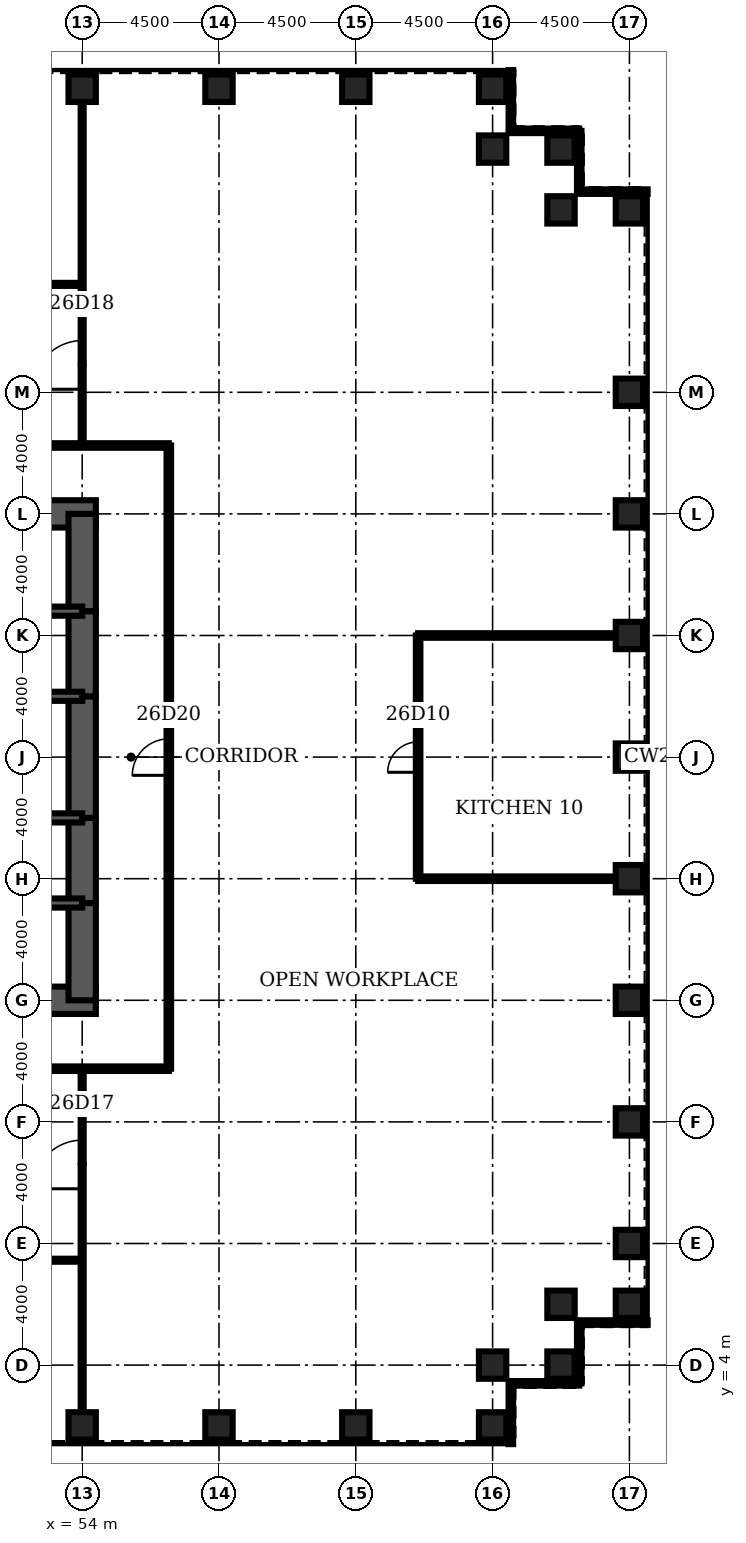
"""IFC4 building model, lengths in metres.
Left out: names, types, materials, properties, quantities, classifications, styles, units other than length and angle.
Written with IfcOpenShell. Run it as: python <this file> out.ifc"""

import sys

from ifc_helpers import new_model, si_unit, direction, frame, frame_2d, origin, origin_2d, place, context, subcontext, project, spatial, rectangle, hollow_rectangle, extrude, element, fill, save


model = new_model("IFC4")
c1 = context("Model", 3, precision=1e-05, world=origin(), true_north=direction((0.0, 1.0)))
c2 = subcontext(c1, "Body", "Model", "MODEL_VIEW")
j1 = project(units=[si_unit("LENGTHUNIT", "METRE"), si_unit("PLANEANGLEUNIT", "RADIAN")], contexts=[c1])
p1 = place(None, origin())
s1 = spatial("IfcSite", under=j1, at=p1, CompositionType="ELEMENT")
p2 = place(p1, origin())
s2 = spatial("IfcBuilding", under=s1, at=p2, CompositionType="ELEMENT")
p3 = place(p2, frame((0.0, 0.0, 121.5)))
s3 = spatial("IfcBuildingStorey", under=s2, at=p3, CompositionType="ELEMENT", Elevation=121.5)
for number, where, z_axis, x_axis in (
    (1, (54.0, 2.0, 0.0), (0.0, 0.0, 1.0), (0.0, 1.0, 0.0)),
    (2, (58.5, 2.0, 0.0), (0.0, 0.0, 1.0), (0.0, 1.0, 0.0)),
    (3, (63.0, 2.0, 0.0), (0.0, 0.0, 1.0), (0.0, 1.0, 0.0)),
    (4, (67.5, 2.0, 0.0), (0.0, 0.0, 1.0), (0.0, 1.0, 0.0)),
    (5, (67.5, 4.0, 0.0), (0.0, 0.0, 1.0), (0.0, 1.0, 0.0)),
    (6, (69.75, 4.0, 0.0), (0.0, 0.0, 1.0), (1.0, 0.0, 0.0)),
    (7, (69.75, 6.0, 0.0), (0.0, 0.0, 1.0), (1.0, 0.0, 0.0)),
    (8, (72.0, 6.0, 0.0), (0.0, 0.0, 1.0), (1.0, 0.0, 0.0)),
    (9, (72.0, 8.0, 0.0), (0.0, 0.0, 1.0), (1.0, 0.0, 0.0)),
    (10, (72.0, 12.0, 0.0), (0.0, 0.0, 1.0), (1.0, 0.0, 0.0)),
    (11, (72.0, 16.0, 0.0), (0.0, 0.0, 1.0), (1.0, 0.0, 0.0)),
    (12, (72.0, 20.0, 0.0), (0.0, 0.0, 1.0), (1.0, 0.0, 0.0)),
    (13, (72.0, 24.0, 0.0), (0.0, 0.0, 1.0), (1.0, 0.0, 0.0)),
    (14, (72.0, 28.0, 0.0), (0.0, 0.0, 1.0), (1.0, 0.0, 0.0)),
    (15, (72.0, 32.0, 0.0), (0.0, 0.0, 1.0), (1.0, 0.0, 0.0)),
    (16, (72.0, 36.0, 0.0), (0.0, 0.0, 1.0), (1.0, 0.0, 0.0)),
    (17, (72.0, 42.0, 0.0), (0.0, 0.0, 1.0), (1.0, 0.0, 0.0)),
    (18, (69.75, 42.0, 0.0), (0.0, 0.0, 1.0), (1.0, 0.0, 0.0)),
    (19, (69.75, 44.0, 0.0), (0.0, 0.0, 1.0), (1.0, 0.0, 0.0)),
    (20, (67.5, 44.0, 0.0), (0.0, 0.0, 1.0), (0.0, 1.0, 0.0)),
    (21, (67.5, 46.0, 0.0), (0.0, 0.0, 1.0), (0.0, 1.0, 0.0)),
    (22, (63.0, 46.0, 0.0), (0.0, 0.0, 1.0), (0.0, 1.0, 0.0)),
    (23, (58.5, 46.0, 0.0), (0.0, 0.0, 1.0), (0.0, 1.0, 0.0)),
    (24, (54.0, 46.0, 0.0), (0.0, 0.0, 1.0), (0.0, 1.0, 0.0)),
):
    element("IfcColumn", number, at=place(p3, frame(where, z_axis=z_axis, x_axis=x_axis)), inside=s3, PredefinedType="COLUMN", context=c2, shape_type="SweptSolid", body=[
        extrude(hollow_rectangle(XDim=0.9, YDim=0.9, WallThickness=0.1, at=origin_2d()), origin(), (0.0, 0.0, 1.0), 4.2),
    ])
for number, where, z_axis, x_axis in (
    (25, (45.0, 16.0, 0.0), (0.0, 0.0, 1.0), (1.0, 0.0, 0.0)),
    (26, (54.45, 32.0, 0.0), (0.0, 0.0, 1.0), (-1.0, 0.0, 0.0)),
):
    element("IfcWall", number, at=place(p3, frame(where, z_axis=z_axis, x_axis=x_axis)), inside=s3, PredefinedType="SHEAR", context=c2, shape_type="SweptSolid", body=[
        extrude(rectangle(XDim=9.45, YDim=0.9, at=frame_2d((4.725, 0.0))), origin(), (0.0, 0.0, 1.0), 4.2),
    ])
p4 = place(p3, frame((54.0, 16.0, 0.0), z_axis=(0.0, 0.0, 1.0), x_axis=(0.0, 1.0, 0.0)))
e27 = element("IfcWall", 27, at=p4, inside=s3, PredefinedType="SHEAR", context=c2, shape_type="SweptSolid", body=[
    extrude(rectangle(XDim=3.2, YDim=0.9, at=frame_2d((1.6, 0.0))), origin(), (0.0, 0.0, 1.0), 4.2),
])
p5 = place(p3, frame((54.0, 19.2, 0.0), z_axis=(0.0, 0.0, 1.0), x_axis=(0.0, 1.0, 0.0)))
e28 = element("IfcWall", 28, at=p5, inside=s3, PredefinedType="SHEAR", context=c2, shape_type="SweptSolid", body=[
    extrude(rectangle(XDim=2.8, YDim=0.9, at=frame_2d((1.4, 0.0))), origin(), (0.0, 0.0, 1.0), 4.2),
])
p6 = place(p5, frame((0.4, 0.0, 0.0)))
e29 = element("IfcOpeningElement", 29, at=p6, cuts=e28, PredefinedType="OPENING", context=c2, shape_type="SweptSolid", body=[
    extrude(rectangle(XDim=1.8, YDim=2.1, at=frame_2d((0.9, 1.05))), frame((0.0, 0.46, 0.0), z_axis=(0.0, -1.0, 0.0), x_axis=(1.0, 0.0, 0.0)), (0.0, 0.0, 1.0), 0.92),
])
p7 = place(p3, frame((54.0, 22.0, 0.0), z_axis=(0.0, 0.0, 1.0), x_axis=(0.0, 1.0, 0.0)))
e30 = element("IfcWall", 30, at=p7, inside=s3, PredefinedType="SHEAR", context=c2, shape_type="SweptSolid", body=[
    extrude(rectangle(XDim=4.0, YDim=0.9, at=frame_2d((2.0, 0.0))), origin(), (0.0, 0.0, 1.0), 4.2),
])
p8 = place(p3, frame((54.0, 26.0, 0.0), z_axis=(0.0, 0.0, 1.0), x_axis=(0.0, 1.0, 0.0)))
e31 = element("IfcWall", 31, at=p8, inside=s3, PredefinedType="SHEAR", context=c2, shape_type="SweptSolid", body=[
    extrude(rectangle(XDim=2.8, YDim=0.9, at=frame_2d((1.4, 0.0))), origin(), (0.0, 0.0, 1.0), 4.2),
])
p9 = place(p8, frame((0.6, 0.0, 0.0)))
e32 = element("IfcOpeningElement", 32, at=p9, cuts=e31, PredefinedType="OPENING", context=c2, shape_type="SweptSolid", body=[
    extrude(rectangle(XDim=1.8, YDim=2.1, at=frame_2d((0.9, 1.05))), frame((0.0, 0.46, 0.0), z_axis=(0.0, -1.0, 0.0), x_axis=(1.0, 0.0, 0.0)), (0.0, 0.0, 1.0), 0.92),
])
p10 = place(p3, frame((54.0, 28.8, 0.0), z_axis=(0.0, 0.0, 1.0), x_axis=(0.0, 1.0, 0.0)))
e33 = element("IfcWall", 33, at=p10, inside=s3, PredefinedType="SHEAR", context=c2, shape_type="SweptSolid", body=[
    extrude(rectangle(XDim=3.2, YDim=0.9, at=frame_2d((1.6, 0.0))), origin(), (0.0, 0.0, 1.0), 4.2),
])
p11 = place(p3, frame((45.0, 19.2, 0.0), z_axis=(0.0, 0.0, 1.0), x_axis=(1.0, 0.0, 0.0)))
e34 = element("IfcWall", 34, at=p11, inside=s3, PredefinedType="SOLIDWALL", context=c2, shape_type="SweptSolid", body=[
    extrude(rectangle(XDim=9.0, YDim=0.3, at=frame_2d((4.5, 0.0))), origin(), (0.0, 0.0, 1.0), 4.2),
])
p12 = place(p11, frame((7.35, 0.0, 0.0)))
e35 = element("IfcOpeningElement", 35, at=p12, cuts=e34, PredefinedType="OPENING", context=c2, shape_type="SweptSolid", body=[
    extrude(rectangle(XDim=1.0, YDim=2.1, at=frame_2d((0.5, 1.05))), frame((0.0, 0.16, 0.0), z_axis=(0.0, -1.0, 0.0), x_axis=(1.0, 0.0, 0.0)), (0.0, 0.0, 1.0), 0.32),
])
p13 = place(p3, frame((45.0, 28.8, 0.0), z_axis=(0.0, 0.0, 1.0), x_axis=(1.0, 0.0, 0.0)))
e36 = element("IfcWall", 36, at=p13, inside=s3, PredefinedType="SOLIDWALL", context=c2, shape_type="SweptSolid", body=[
    extrude(rectangle(XDim=9.0, YDim=0.3, at=frame_2d((4.5, 0.0))), origin(), (0.0, 0.0, 1.0), 4.2),
])
p14 = place(p13, frame((7.35, 0.0, 0.0)))
e37 = element("IfcOpeningElement", 37, at=p14, cuts=e36, PredefinedType="OPENING", context=c2, shape_type="SweptSolid", body=[
    extrude(rectangle(XDim=1.0, YDim=2.1, at=frame_2d((0.5, 1.05))), frame((0.0, 0.16, 0.0), z_axis=(0.0, -1.0, 0.0), x_axis=(1.0, 0.0, 0.0)), (0.0, 0.0, 1.0), 0.32),
])
p15 = place(p3, frame((48.0, 22.0, 0.0), z_axis=(0.0, 0.0, 1.0), x_axis=(1.0, 0.0, 0.0)))
e38 = element("IfcWall", 38, at=p15, inside=s3, PredefinedType="SOLIDWALL", context=c2, shape_type="SweptSolid", body=[
    extrude(rectangle(XDim=6.0, YDim=0.3, at=frame_2d((3.0, 0.0))), origin(), (0.0, 0.0, 1.0), 4.2),
])
p16 = place(p15, frame((2.0, 0.0, 0.0)))
e39 = element("IfcOpeningElement", 39, at=p16, cuts=e38, PredefinedType="OPENING", context=c2, shape_type="SweptSolid", body=[
    extrude(rectangle(XDim=1.0, YDim=2.1, at=frame_2d((0.5, 1.05))), frame((0.0, 0.16, 0.0), z_axis=(0.0, -1.0, 0.0), x_axis=(1.0, 0.0, 0.0)), (0.0, 0.0, 1.0), 0.32),
])
p17 = place(p15, frame((4.3, 0.0, 0.0)))
e40 = element("IfcOpeningElement", 40, at=p17, cuts=e38, PredefinedType="OPENING", context=c2, shape_type="SweptSolid", body=[
    extrude(rectangle(XDim=1.0, YDim=2.1, at=frame_2d((0.5, 1.05))), frame((0.0, 0.16, 0.0), z_axis=(0.0, -1.0, 0.0), x_axis=(1.0, 0.0, 0.0)), (0.0, 0.0, 1.0), 0.32),
])
p18 = place(p3, frame((48.0, 26.0, 0.0), z_axis=(0.0, 0.0, 1.0), x_axis=(1.0, 0.0, 0.0)))
e41 = element("IfcWall", 41, at=p18, inside=s3, PredefinedType="SOLIDWALL", context=c2, shape_type="SweptSolid", body=[
    extrude(rectangle(XDim=6.0, YDim=0.3, at=frame_2d((3.0, 0.0))), origin(), (0.0, 0.0, 1.0), 4.2),
])
p19 = place(p3, frame((36.0, 7.45, 0.0), z_axis=(0.0, 0.0, 1.0), x_axis=(1.0, 0.0, 0.0)))
e42 = element("IfcWall", 42, at=p19, inside=s3, PredefinedType="PARTITIONING", context=c2, shape_type="SweptSolid", body=[
    extrude(rectangle(XDim=18.0, YDim=0.1, at=frame_2d((9.0, 0.0))), origin(), (0.0, 0.0, 1.0), 3.0),
])
p20 = place(p19, frame((4.0, 0.0, 0.0)))
e43 = element("IfcOpeningElement", 43, at=p20, cuts=e42, PredefinedType="OPENING", context=c2, shape_type="SweptSolid", body=[
    extrude(rectangle(XDim=1.0, YDim=2.1, at=frame_2d((0.5, 1.05))), frame((0.0, 0.06, 0.0), z_axis=(0.0, -1.0, 0.0), x_axis=(1.0, 0.0, 0.0)), (0.0, 0.0, 1.0), 0.12),
])
p21 = place(p19, frame((13.0, 0.0, 0.0)))
e44 = element("IfcOpeningElement", 44, at=p21, cuts=e42, PredefinedType="OPENING", context=c2, shape_type="SweptSolid", body=[
    extrude(rectangle(XDim=1.0, YDim=2.1, at=frame_2d((0.5, 1.05))), frame((0.0, 0.06, 0.0), z_axis=(0.0, -1.0, 0.0), x_axis=(1.0, 0.0, 0.0)), (0.0, 0.0, 1.0), 0.12),
])
p22 = place(p3, frame((15.15, 13.75, 0.0), z_axis=(0.0, 0.0, 1.0), x_axis=(1.0, 0.0, 0.0)))
e45 = element("IfcWall", 45, at=p22, inside=s3, PredefinedType="PARTITIONING", context=c2, shape_type="SweptSolid", body=[
    extrude(rectangle(XDim=41.7, YDim=0.15, at=frame_2d((20.85, 0.0))), origin(), (0.0, 0.0, 1.0), 3.0),
])
p23 = place(p22, frame((29.275, 0.0, 0.0)))
e46 = element("IfcOpeningElement", 46, at=p23, cuts=e45, PredefinedType="OPENING", context=c2, shape_type="SweptSolid", body=[
    extrude(rectangle(XDim=1.2, YDim=2.1, at=frame_2d((0.6, 1.05))), frame((0.0, 0.085, 0.0), z_axis=(0.0, -1.0, 0.0), x_axis=(1.0, 0.0, 0.0)), (0.0, 0.0, 1.0), 0.17),
])
for number, where, z_axis, x_axis in (
    (47, (65.05, 20.0, 0.0), (0.0, 0.0, 1.0), (1.0, 0.0, 0.0)),
    (48, (65.05, 28.0, 0.0), (0.0, 0.0, 1.0), (1.0, 0.0, 0.0)),
):
    element("IfcWall", number, at=place(p3, frame(where, z_axis=z_axis, x_axis=x_axis)), inside=s3, PredefinedType="PARTITIONING", context=c2, shape_type="SweptSolid", body=[
        extrude(rectangle(XDim=6.5, YDim=0.15, at=frame_2d((3.25, 0.0))), origin(), (0.0, 0.0, 1.0), 3.0),
    ])
p24 = place(p3, frame((15.15, 34.25, 0.0), z_axis=(0.0, 0.0, 1.0), x_axis=(1.0, 0.0, 0.0)))
e49 = element("IfcWall", 49, at=p24, inside=s3, PredefinedType="PARTITIONING", context=c2, shape_type="SweptSolid", body=[
    extrude(rectangle(XDim=41.7, YDim=0.15, at=frame_2d((20.85, 0.0))), origin(), (0.0, 0.0, 1.0), 3.0),
])
p25 = place(p24, frame((20.25, 0.0, 0.0)))
e50 = element("IfcOpeningElement", 50, at=p25, cuts=e49, PredefinedType="OPENING", context=c2, shape_type="SweptSolid", body=[
    extrude(rectangle(XDim=1.2, YDim=2.1, at=frame_2d((0.6, 1.05))), frame((0.0, 0.085, 0.0), z_axis=(0.0, -1.0, 0.0), x_axis=(1.0, 0.0, 0.0)), (0.0, 0.0, 1.0), 0.17),
])
p26 = place(p3, frame((18.0, 39.55, 0.0), z_axis=(0.0, 0.0, 1.0), x_axis=(1.0, 0.0, 0.0)))
e51 = element("IfcWall", 51, at=p26, inside=s3, PredefinedType="PARTITIONING", context=c2, shape_type="SweptSolid", body=[
    extrude(rectangle(XDim=36.0, YDim=0.1, at=frame_2d((18.0, 0.0))), origin(), (0.0, 0.0, 1.0), 3.0),
])
p27 = place(p26, frame((4.0, 0.0, 0.0)))
e52 = element("IfcOpeningElement", 52, at=p27, cuts=e51, PredefinedType="OPENING", context=c2, shape_type="SweptSolid", body=[
    extrude(rectangle(XDim=1.0, YDim=2.1, at=frame_2d((0.5, 1.05))), frame((0.0, 0.06, 0.0), z_axis=(0.0, -1.0, 0.0), x_axis=(1.0, 0.0, 0.0)), (0.0, 0.0, 1.0), 0.12),
])
p28 = place(p26, frame((13.0, 0.0, 0.0)))
e53 = element("IfcOpeningElement", 53, at=p28, cuts=e51, PredefinedType="OPENING", context=c2, shape_type="SweptSolid", body=[
    extrude(rectangle(XDim=1.0, YDim=2.1, at=frame_2d((0.5, 1.05))), frame((0.0, 0.06, 0.0), z_axis=(0.0, -1.0, 0.0), x_axis=(1.0, 0.0, 0.0)), (0.0, 0.0, 1.0), 0.12),
])
p29 = place(p26, frame((22.0, 0.0, 0.0)))
e54 = element("IfcOpeningElement", 54, at=p29, cuts=e51, PredefinedType="OPENING", context=c2, shape_type="SweptSolid", body=[
    extrude(rectangle(XDim=1.0, YDim=2.1, at=frame_2d((0.5, 1.05))), frame((0.0, 0.06, 0.0), z_axis=(0.0, -1.0, 0.0), x_axis=(1.0, 0.0, 0.0)), (0.0, 0.0, 1.0), 0.12),
])
p30 = place(p26, frame((31.0, 0.0, 0.0)))
e55 = element("IfcOpeningElement", 55, at=p30, cuts=e51, PredefinedType="OPENING", context=c2, shape_type="SweptSolid", body=[
    extrude(rectangle(XDim=1.0, YDim=2.1, at=frame_2d((0.5, 1.05))), frame((0.0, 0.06, 0.0), z_axis=(0.0, -1.0, 0.0), x_axis=(1.0, 0.0, 0.0)), (0.0, 0.0, 1.0), 0.12),
])
p31 = place(p3, frame((54.0, 2.45, 0.0), z_axis=(0.0, 0.0, 1.0), x_axis=(0.0, 1.0, 0.0)))
e56 = element("IfcWall", 56, at=p31, inside=s3, PredefinedType="PARTITIONING", context=c2, shape_type="SweptSolid", body=[
    extrude(rectangle(XDim=11.3, YDim=0.1, at=frame_2d((5.65, 0.0))), origin(), (0.0, 0.0, 1.0), 3.0),
])
p32 = place(p31, frame((7.35, 0.0, 0.0)))
e57 = element("IfcOpeningElement", 57, at=p32, cuts=e56, PredefinedType="OPENING", context=c2, shape_type="SweptSolid", body=[
    extrude(rectangle(XDim=1.6, YDim=2.1, at=frame_2d((0.8, 1.05))), frame((0.0, 0.06, 0.0), z_axis=(0.0, -1.0, 0.0), x_axis=(1.0, 0.0, 0.0)), (0.0, 0.0, 1.0), 0.12),
])
p33 = place(p3, frame((54.0, 34.25, 0.0), z_axis=(0.0, 0.0, 1.0), x_axis=(0.0, 1.0, 0.0)))
e58 = element("IfcWall", 58, at=p33, inside=s3, PredefinedType="PARTITIONING", context=c2, shape_type="SweptSolid", body=[
    extrude(rectangle(XDim=11.3, YDim=0.1, at=frame_2d((5.65, 0.0))), origin(), (0.0, 0.0, 1.0), 3.0),
])
p34 = place(p33, frame((1.85, 0.0, 0.0)))
e59 = element("IfcOpeningElement", 59, at=p34, cuts=e58, PredefinedType="OPENING", context=c2, shape_type="SweptSolid", body=[
    extrude(rectangle(XDim=1.6, YDim=2.1, at=frame_2d((0.8, 1.05))), frame((0.0, 0.06, 0.0), z_axis=(0.0, -1.0, 0.0), x_axis=(1.0, 0.0, 0.0)), (0.0, 0.0, 1.0), 0.12),
])
p35 = place(p3, frame((56.85, 13.75, 0.0), z_axis=(0.0, 0.0, 1.0), x_axis=(0.0, 1.0, 0.0)))
e60 = element("IfcWall", 60, at=p35, inside=s3, PredefinedType="PARTITIONING", context=c2, shape_type="SweptSolid", body=[
    extrude(rectangle(XDim=20.5, YDim=0.15, at=frame_2d((10.25, 0.0))), origin(), (0.0, 0.0, 1.0), 3.0),
])
p36 = place(p35, frame((9.65, 0.0, 0.0)))
e61 = element("IfcOpeningElement", 61, at=p36, cuts=e60, PredefinedType="OPENING", context=c2, shape_type="SweptSolid", body=[
    extrude(rectangle(XDim=1.2, YDim=2.1, at=frame_2d((0.6, 1.05))), frame((0.0, 0.085, 0.0), z_axis=(0.0, -1.0, 0.0), x_axis=(1.0, 0.0, 0.0)), (0.0, 0.0, 1.0), 0.17),
])
p37 = place(p3, frame((65.05, 20.0, 0.0), z_axis=(0.0, 0.0, 1.0), x_axis=(0.0, 1.0, 0.0)))
e62 = element("IfcWall", 62, at=p37, inside=s3, PredefinedType="PARTITIONING", context=c2, shape_type="SweptSolid", body=[
    extrude(rectangle(XDim=8.0, YDim=0.15, at=frame_2d((4.0, 0.0))), origin(), (0.0, 0.0, 1.0), 3.0),
])
p38 = place(p37, frame((3.5, 0.0, 0.0)))
e63 = element("IfcOpeningElement", 63, at=p38, cuts=e62, PredefinedType="OPENING", context=c2, shape_type="SweptSolid", body=[
    extrude(rectangle(XDim=1.0, YDim=2.1, at=frame_2d((0.5, 1.05))), frame((0.0, 0.085, 0.0), z_axis=(0.0, -1.0, 0.0), x_axis=(1.0, 0.0, 0.0)), (0.0, 0.0, 1.0), 0.17),
])
p39 = place(p3, frame((68.1, 1.4, 0.0), z_axis=(0.0, 0.0, 1.0), x_axis=(0.0, 1.0, 0.0)))
e64 = element("IfcWall", 64, at=p39, inside=s3, PredefinedType="ELEMENTEDWALL", context=c2, shape_type="SweptSolid", body=[
    extrude(rectangle(XDim=2.0, YDim=0.15, at=frame_2d((1.0, 0.0))), origin(), (0.0, 0.0, 1.0), 4.04),
])
p40 = place(p3, frame((68.1, 3.4, 0.0), z_axis=(0.0, 0.0, 1.0), x_axis=(1.0, 0.0, 0.0)))
e65 = element("IfcWall", 65, at=p40, inside=s3, PredefinedType="ELEMENTEDWALL", context=c2, shape_type="SweptSolid", body=[
    extrude(rectangle(XDim=2.25, YDim=0.15, at=frame_2d((1.125, 0.0))), origin(), (0.0, 0.0, 1.0), 4.04),
])
p41 = place(p3, frame((70.35, 3.4, 0.0), z_axis=(0.0, 0.0, 1.0), x_axis=(0.0, 1.0, 0.0)))
e66 = element("IfcWall", 66, at=p41, inside=s3, PredefinedType="ELEMENTEDWALL", context=c2, shape_type="SweptSolid", body=[
    extrude(rectangle(XDim=2.0, YDim=0.15, at=frame_2d((1.0, 0.0))), origin(), (0.0, 0.0, 1.0), 4.04),
])
for number, where, z_axis, x_axis in (
    (67, (70.35, 5.4, 0.0), (0.0, 0.0, 1.0), (1.0, 0.0, 0.0)),
    (68, (72.6, 42.6, 0.0), (0.0, 0.0, 1.0), (-1.0, 0.0, 0.0)),
):
    element("IfcWall", number, at=place(p3, frame(where, z_axis=z_axis, x_axis=x_axis)), inside=s3, PredefinedType="ELEMENTEDWALL", context=c2, shape_type="SweptSolid", body=[
        extrude(rectangle(XDim=2.25, YDim=0.15, at=frame_2d((1.125, 0.0))), origin(), (0.0, 0.0, 1.0), 4.04),
    ])
p42 = place(p3, frame((70.35, 42.6, 0.0), z_axis=(0.0, 0.0, 1.0), x_axis=(0.0, 1.0, 0.0)))
e69 = element("IfcWall", 69, at=p42, inside=s3, PredefinedType="ELEMENTEDWALL", context=c2, shape_type="SweptSolid", body=[
    extrude(rectangle(XDim=2.0, YDim=0.15, at=frame_2d((1.0, 0.0))), origin(), (0.0, 0.0, 1.0), 4.04),
])
p43 = place(p3, frame((70.35, 44.6, 0.0), z_axis=(0.0, 0.0, 1.0), x_axis=(-1.0, 0.0, 0.0)))
e70 = element("IfcWall", 70, at=p43, inside=s3, PredefinedType="ELEMENTEDWALL", context=c2, shape_type="SweptSolid", body=[
    extrude(rectangle(XDim=2.25, YDim=0.15, at=frame_2d((1.125, 0.0))), origin(), (0.0, 0.0, 1.0), 4.04),
])
p44 = place(p3, frame((68.1, 44.6, 0.0), z_axis=(0.0, 0.0, 1.0), x_axis=(0.0, 1.0, 0.0)))
e71 = element("IfcWall", 71, at=p44, inside=s3, PredefinedType="ELEMENTEDWALL", context=c2, shape_type="SweptSolid", body=[
    extrude(rectangle(XDim=2.0, YDim=0.15, at=frame_2d((1.0, 0.0))), origin(), (0.0, 0.0, 1.0), 4.04),
])
p45 = place(p38, origin())
e72 = element("IfcDoor", 72, at=p45, inside=s3, OperationType="SINGLE_SWING_LEFT", PredefinedType="DOOR", context=c2, shape_type="SweptSolid", body=[
    extrude(rectangle(XDim=1.0, YDim=2.1, at=frame_2d((0.5, 1.05))), frame((0.0, 0.025, 0.0), z_axis=(0.0, -1.0, 0.0), x_axis=(1.0, 0.0, 0.0)), (0.0, 0.0, 1.0), 0.05),
])
fill(e63, e72)
p46 = place(p32, origin())
e73 = element("IfcDoor", 73, at=p46, inside=s3, OperationType="SINGLE_SWING_LEFT", PredefinedType="DOOR", context=c2, shape_type="SweptSolid", body=[
    extrude(rectangle(XDim=1.6, YDim=2.1, at=frame_2d((0.8, 1.05))), frame((0.0, 0.025, 0.0), z_axis=(0.0, -1.0, 0.0), x_axis=(1.0, 0.0, 0.0)), (0.0, 0.0, 1.0), 0.05),
])
fill(e57, e73)
p47 = place(p34, origin())
e74 = element("IfcDoor", 74, at=p47, inside=s3, OperationType="SINGLE_SWING_LEFT", PredefinedType="DOOR", context=c2, shape_type="SweptSolid", body=[
    extrude(rectangle(XDim=1.6, YDim=2.1, at=frame_2d((0.8, 1.05))), frame((0.0, 0.025, 0.0), z_axis=(0.0, -1.0, 0.0), x_axis=(1.0, 0.0, 0.0)), (0.0, 0.0, 1.0), 0.05),
])
fill(e59, e74)
p48 = place(p36, origin())
e75 = element("IfcDoor", 75, at=p48, inside=s3, OperationType="SINGLE_SWING_LEFT", PredefinedType="DOOR", context=c2, shape_type="SweptSolid", body=[
    extrude(rectangle(XDim=1.2, YDim=2.1, at=frame_2d((0.6, 1.05))), frame((0.0, 0.025, 0.0), z_axis=(0.0, -1.0, 0.0), x_axis=(1.0, 0.0, 0.0)), (0.0, 0.0, 1.0), 0.05),
])
fill(e61, e75)
p49 = place(p12, origin())
e76 = element("IfcDoor", 76, at=p49, inside=s3, OperationType="SINGLE_SWING_RIGHT", PredefinedType="DOOR", context=c2, shape_type="SweptSolid", body=[
    extrude(rectangle(XDim=1.0, YDim=2.1, at=frame_2d((0.5, 1.05))), frame((0.0, 0.025, 0.0), z_axis=(0.0, -1.0, 0.0), x_axis=(1.0, 0.0, 0.0)), (0.0, 0.0, 1.0), 0.05),
])
fill(e35, e76)
p50 = place(p14, origin())
e77 = element("IfcDoor", 77, at=p50, inside=s3, OperationType="SINGLE_SWING_RIGHT", PredefinedType="DOOR", context=c2, shape_type="SweptSolid", body=[
    extrude(rectangle(XDim=1.0, YDim=2.1, at=frame_2d((0.5, 1.05))), frame((0.0, 0.025, 0.0), z_axis=(0.0, -1.0, 0.0), x_axis=(1.0, 0.0, 0.0)), (0.0, 0.0, 1.0), 0.05),
])
fill(e37, e77)
p51 = place(p6, origin())
e78 = element("IfcDoor", 78, at=p51, inside=s3, OperationType="SINGLE_SWING_LEFT", PredefinedType="DOOR", context=c2, shape_type="SweptSolid", body=[
    extrude(rectangle(XDim=1.8, YDim=2.1, at=frame_2d((0.9, 1.05))), frame((0.0, 0.45, 0.0), z_axis=(0.0, -1.0, 0.0), x_axis=(1.0, 0.0, 0.0)), (0.0, 0.0, 1.0), 0.899),
])
fill(e29, e78)
p52 = place(p9, origin())
e79 = element("IfcDoor", 79, at=p52, inside=s3, OperationType="SINGLE_SWING_LEFT", PredefinedType="DOOR", context=c2, shape_type="SweptSolid", body=[
    extrude(rectangle(XDim=1.8, YDim=2.1, at=frame_2d((0.9, 1.05))), frame((0.0, 0.45, 0.0), z_axis=(0.0, -1.0, 0.0), x_axis=(1.0, 0.0, 0.0)), (0.0, 0.0, 1.0), 0.899),
])
fill(e32, e79)
p53 = place(p17, origin())
e80 = element("IfcDoor", 80, at=p53, inside=s3, OperationType="SINGLE_SWING_RIGHT", PredefinedType="DOOR", context=c2, shape_type="SweptSolid", body=[
    extrude(rectangle(XDim=1.0, YDim=2.1, at=frame_2d((0.5, 1.05))), frame((0.0, 0.025, 0.0), z_axis=(0.0, -1.0, 0.0), x_axis=(1.0, 0.0, 0.0)), (0.0, 0.0, 1.0), 0.05),
])
fill(e40, e80)
save(model, sys.argv[1])
